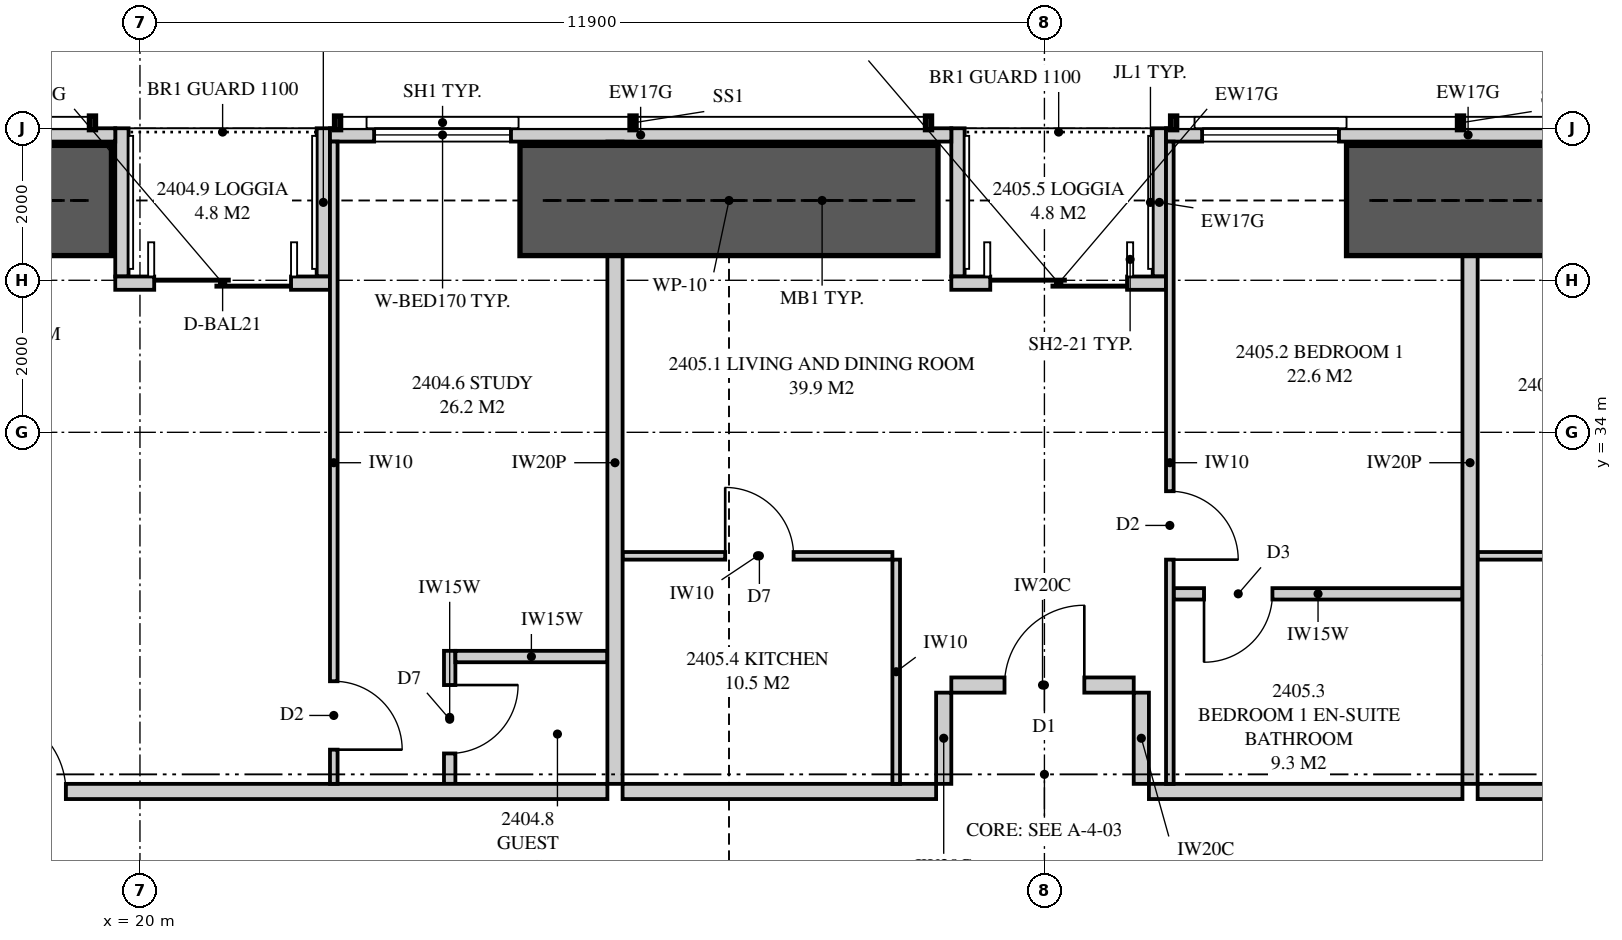
"""IFC4 building model, lengths in metres.
Left out: names, types, materials, properties, quantities, classifications, styles, units other than length and angle.
Written with IfcOpenShell. Run it as: python <this file> out.ifc"""

import sys

from ifc_helpers import new_model, si_unit, direction, frame, frame_2d, origin, place, context, subcontext, project, spatial, polyline, rectangle, outline, extrude, element, fill, save


model = new_model("IFC4")
c1 = context("Model", 3, precision=1e-05, world=origin(), true_north=direction((0.0, 1.0)))
c2 = subcontext(c1, "Body", "Model", "MODEL_VIEW")
j1 = project(units=[si_unit("LENGTHUNIT", "METRE"), si_unit("PLANEANGLEUNIT", "RADIAN")], contexts=[c1])
p1 = place(None, origin())
s1 = spatial("IfcSite", under=j1, at=p1, CompositionType="ELEMENT")
p2 = place(p1, origin())
s2 = spatial("IfcBuilding", under=s1, at=p2, CompositionType="ELEMENT")
p3 = place(p2, frame((0.0, 0.0, 91.45)))
s3 = spatial("IfcBuildingStorey", under=s2, at=p3, CompositionType="ELEMENT", Elevation=91.45)
p4 = place(p3, frame((41.449, 37.913, 0.0), z_axis=(0.0, 0.0, 1.0), x_axis=(-1.0, 0.0, 0.0)))
e1 = element("IfcWall", 1, at=p4, inside=s3, PredefinedType="SOLIDWALL", context=c2, shape_type="SweptSolid", body=[
    extrude(outline(polyline([(0.0, 0.0), (7.949, 0.0), (7.949, 2.15), (2.824, 2.15), (2.824, 3.11), (2.666, 3.11), (2.666, 2.15), (2.62, 2.15), (2.62, 3.11), (0.0, 3.11), (0.0, 0.0)])), frame((0.0, 0.087, 0.0), z_axis=(0.0, -1.0, 0.0), x_axis=(1.0, 0.0, 0.0)), (0.0, 0.0, 1.0), 0.175),
])
p5 = place(p4, frame((5.674, 0.0, 0.4)))
e2 = element("IfcOpeningElement", 2, at=p5, cuts=e1, PredefinedType="OPENING", context=c2, shape_type="SweptSolid", body=[
    extrude(rectangle(XDim=1.8, YDim=1.7, at=frame_2d((0.9, 0.85))), frame((0.0, 0.097, 0.0), z_axis=(0.0, -1.0, 0.0), x_axis=(1.0, 0.0, 0.0)), (0.0, 0.0, 1.0), 0.195),
])
p6 = place(p3, frame((30.675, 37.913, 0.0), z_axis=(0.0, 0.0, 1.0), x_axis=(-1.0, 0.0, 0.0)))
e3 = element("IfcWall", 3, at=p6, inside=s3, PredefinedType="SOLIDWALL", context=c2, shape_type="SweptSolid", body=[
    extrude(rectangle(XDim=8.175, YDim=0.175, at=frame_2d((4.087, 0.0))), origin(), (0.0, 0.0, 1.0), 2.15),
])
p7 = place(p6, frame((5.794, 0.0, 0.4)))
e4 = element("IfcOpeningElement", 4, at=p7, cuts=e3, PredefinedType="OPENING", context=c2, shape_type="SweptSolid", body=[
    extrude(rectangle(XDim=1.8, YDim=1.7, at=frame_2d((0.9, 0.85))), frame((0.0, 0.097, 0.0), z_axis=(0.0, -1.0, 0.0), x_axis=(1.0, 0.0, 0.0)), (0.0, 0.0, 1.0), 0.195),
])
p8 = place(p3, frame((19.675, 37.913, 0.0), z_axis=(0.0, 0.0, 1.0), x_axis=(-1.0, 0.0, 0.0)))
e5 = element("IfcWall", 5, at=p8, inside=s3, PredefinedType="SOLIDWALL", context=c2, shape_type="SweptSolid", body=[
    extrude(outline(polyline([(0.0, 0.0), (10.624, 0.0), (10.624, 3.11), (3.003, 3.11), (3.003, 2.15), (2.958, 2.15), (2.958, 3.11), (2.8, 3.11), (2.8, 2.15), (0.0, 2.15), (0.0, 0.0)])), frame((0.0, 0.087, 0.0), z_axis=(0.0, -1.0, 0.0), x_axis=(1.0, 0.0, 0.0)), (0.0, 0.0, 1.0), 0.175),
])
p9 = place(p8, frame((6.475, 0.0, 0.4)))
e6 = element("IfcOpeningElement", 6, at=p9, cuts=e5, PredefinedType="OPENING", context=c2, shape_type="SweptSolid", body=[
    extrude(rectangle(XDim=1.8, YDim=1.7, at=frame_2d((0.9, 0.85))), frame((0.0, 0.097, 0.0), z_axis=(0.0, -1.0, 0.0), x_axis=(1.0, 0.0, 0.0)), (0.0, 0.0, 1.0), 0.195),
])
p10 = place(p3, frame((33.5, 35.962, 0.0), z_axis=(0.0, 0.0, 1.0), x_axis=(-1.0, 0.0, 0.0)))
e7 = element("IfcWall", 7, at=p10, inside=s3, PredefinedType="SOLIDWALL", context=c2, shape_type="SweptSolid", body=[
    extrude(rectangle(XDim=2.825, YDim=0.175, at=frame_2d((1.413, 0.0))), origin(), (0.0, 0.0, 1.0), 3.11),
])
p11 = place(p10, frame((0.512, 0.0, 0.0)))
e8 = element("IfcOpeningElement", 8, at=p11, cuts=e7, PredefinedType="OPENING", context=c2, shape_type="SweptSolid", body=[
    extrude(rectangle(XDim=1.8, YDim=2.1, at=frame_2d((0.9, 1.05))), frame((0.0, 0.097, 0.0), z_axis=(0.0, -1.0, 0.0), x_axis=(1.0, 0.0, 0.0)), (0.0, 0.0, 1.0), 0.195),
])
for number, where, z_axis, x_axis in (
    (9, (33.413, 38.0, 0.0), (0.0, 0.0, 1.0), (0.0, -1.0, 0.0)),
    (10, (30.762, 38.0, 0.0), (0.0, 0.0, 1.0), (0.0, -1.0, 0.0)),
):
    element("IfcWall", number, at=place(p3, frame(where, z_axis=z_axis, x_axis=x_axis)), inside=s3, PredefinedType="SOLIDWALL", context=c2, shape_type="SweptSolid", body=[
        extrude(outline(polyline([(0.0, 0.0), (1.95, 0.0), (1.95, 3.11), (1.75, 3.11), (1.75, 2.15), (0.15, 2.15), (0.15, 3.11), (0.0, 3.11), (0.0, 0.0)])), frame((0.0, 0.087, 0.0), z_axis=(0.0, -1.0, 0.0), x_axis=(1.0, 0.0, 0.0)), (0.0, 0.0, 1.0), 0.175),
    ])
p12 = place(p3, frame((22.5, 35.962, 0.0), z_axis=(0.0, 0.0, 1.0), x_axis=(-1.0, 0.0, 0.0)))
e11 = element("IfcWall", 11, at=p12, inside=s3, PredefinedType="SOLIDWALL", context=c2, shape_type="SweptSolid", body=[
    extrude(rectangle(XDim=2.825, YDim=0.175, at=frame_2d((1.413, 0.0))), origin(), (0.0, 0.0, 1.0), 3.11),
])
p13 = place(p12, frame((0.512, 0.0, 0.0)))
e12 = element("IfcOpeningElement", 12, at=p13, cuts=e11, PredefinedType="OPENING", context=c2, shape_type="SweptSolid", body=[
    extrude(rectangle(XDim=1.8, YDim=2.1, at=frame_2d((0.9, 1.05))), frame((0.0, 0.097, 0.0), z_axis=(0.0, -1.0, 0.0), x_axis=(1.0, 0.0, 0.0)), (0.0, 0.0, 1.0), 0.195),
])
for number, where, z_axis, x_axis in (
    (13, (22.413, 38.0, 0.0), (0.0, 0.0, 1.0), (0.0, -1.0, 0.0)),
    (14, (19.762, 38.0, 0.0), (0.0, 0.0, 1.0), (0.0, -1.0, 0.0)),
):
    element("IfcWall", number, at=place(p3, frame(where, z_axis=z_axis, x_axis=x_axis)), inside=s3, PredefinedType="SOLIDWALL", context=c2, shape_type="SweptSolid", body=[
        extrude(outline(polyline([(0.0, 0.0), (1.95, 0.0), (1.95, 3.11), (1.75, 3.11), (1.75, 2.15), (0.15, 2.15), (0.15, 3.11), (0.0, 3.11), (0.0, 0.0)])), frame((0.0, 0.087, 0.0), z_axis=(0.0, -1.0, 0.0), x_axis=(1.0, 0.0, 0.0)), (0.0, 0.0, 1.0), 0.175),
    ])
p14 = place(p3, frame((26.25, 37.825, 0.0), z_axis=(0.0, 0.0, 1.0), x_axis=(0.0, -1.0, 0.0)))
e15 = element("IfcWall", 15, at=p14, inside=s3, PredefinedType="PARTITIONING", context=c2, shape_type="SweptSolid", body=[
    extrude(outline(polyline([(0.529, 2.15), (0.0, 2.15), (0.0, 0.0), (0.529, 0.0), (0.529, 0.479), (1.021, 0.479), (1.021, 0.0), (8.45, 0.0), (8.45, 3.11), (1.685, 3.11), (1.685, 2.15), (1.021, 2.15), (1.021, 1.671), (0.529, 1.671), (0.529, 2.15)])), frame((0.0, 0.1, 0.0), z_axis=(0.0, -1.0, 0.0), x_axis=(1.0, 0.0, 0.0)), (0.0, 0.0, 1.0), 0.2),
])
p15 = place(p3, frame((17.775, 29.275, 0.0), z_axis=(0.0, 0.0, 1.0), x_axis=(1.0, 0.0, 0.0)))
e16 = element("IfcWall", 16, at=p15, inside=s3, PredefinedType="PARTITIONING", context=c2, shape_type="SweptSolid", body=[
    extrude(rectangle(XDim=8.375, YDim=0.2, at=frame_2d((4.188, 0.0))), origin(), (0.0, 0.0, 1.0), 3.11),
])
p16 = place(p15, frame((0.2, 0.0, 0.0)))
e17 = element("IfcOpeningElement", 17, at=p16, cuts=e16, PredefinedType="OPENING", context=c2, shape_type="SweptSolid", body=[
    extrude(rectangle(XDim=1.05, YDim=2.2, at=frame_2d((0.525, 1.1))), frame((0.0, 0.11, 0.0), z_axis=(0.0, -1.0, 0.0), x_axis=(1.0, 0.0, 0.0)), (0.0, 0.0, 1.0), 0.22),
])
p17 = place(p3, frame((22.55, 37.825, 0.0), z_axis=(0.0, 0.0, 1.0), x_axis=(0.0, -1.0, 0.0)))
e18 = element("IfcWall", 18, at=p17, inside=s3, PredefinedType="PARTITIONING", context=c2, shape_type="SweptSolid", body=[
    extrude(outline(polyline([(0.0, 0.0), (8.45, 0.0), (8.45, 3.11), (1.635, 3.11), (1.635, 2.15), (0.0, 2.15), (0.0, 3.11), (0.0, 0.0)])), frame((0.0, 0.05, 0.0), z_axis=(0.0, -1.0, 0.0), x_axis=(1.0, 0.0, 0.0)), (0.0, 0.0, 1.0), 0.1),
])
p18 = place(p17, frame((7.1, 0.0, 0.0)))
e19 = element("IfcOpeningElement", 19, at=p18, cuts=e18, PredefinedType="OPENING", context=c2, shape_type="SweptSolid", body=[
    extrude(rectangle(XDim=0.9, YDim=2.1, at=frame_2d((0.45, 1.05))), frame((0.0, 0.06, 0.0), z_axis=(0.0, -1.0, 0.0), x_axis=(1.0, 0.0, 0.0)), (0.0, 0.0, 1.0), 0.12),
])
p19 = place(p3, frame((37.5, 37.825, 0.0), z_axis=(0.0, 0.0, 1.0), x_axis=(0.0, -1.0, 0.0)))
e20 = element("IfcWall", 20, at=p19, inside=s3, PredefinedType="PARTITIONING", context=c2, shape_type="SweptSolid", body=[
    extrude(outline(polyline([(0.529, 2.15), (0.0, 2.15), (0.0, 0.0), (0.529, 0.0), (0.529, 0.735), (1.021, 0.735), (1.021, 0.0), (8.45, 0.0), (8.45, 3.11), (1.685, 3.11), (1.685, 2.15), (1.021, 2.15), (1.021, 1.415), (0.529, 1.415), (0.529, 2.15)])), frame((0.0, 0.1, 0.0), z_axis=(0.0, -1.0, 0.0), x_axis=(1.0, 0.0, 0.0)), (0.0, 0.0, 1.0), 0.2),
])
p20 = place(p3, frame((26.35, 29.275, 0.0), z_axis=(0.0, 0.0, 1.0), x_axis=(1.0, 0.0, 0.0)))
e21 = element("IfcWall", 21, at=p20, inside=s3, PredefinedType="PARTITIONING", context=c2, shape_type="SweptSolid", body=[
    extrude(outline(polyline([(0.0, 0.0), (4.125, 0.0), (4.125, 3.11), (1.737, 3.11), (1.737, 2.541), (1.062, 2.541), (1.062, 3.11), (0.0, 3.11), (0.0, 0.0)])), frame((0.0, 0.1, 0.0), z_axis=(0.0, -1.0, 0.0), x_axis=(1.0, 0.0, 0.0)), (0.0, 0.0, 1.0), 0.2),
])
p21 = place(p3, frame((33.55, 37.825, 0.0), z_axis=(0.0, 0.0, 1.0), x_axis=(0.0, -1.0, 0.0)))
e22 = element("IfcWall", 22, at=p21, inside=s3, PredefinedType="PARTITIONING", context=c2, shape_type="SweptSolid", body=[
    extrude(outline(polyline([(0.0, 0.0), (8.45, 0.0), (8.45, 3.11), (1.635, 3.11), (1.635, 2.15), (0.0, 2.15), (0.0, 3.11), (0.0, 0.0)])), frame((0.0, 0.05, 0.0), z_axis=(0.0, -1.0, 0.0), x_axis=(1.0, 0.0, 0.0)), (0.0, 0.0, 1.0), 0.1),
])
p22 = place(p21, frame((4.6, 0.0, 0.0)))
e23 = element("IfcOpeningElement", 23, at=p22, cuts=e22, PredefinedType="OPENING", context=c2, shape_type="SweptSolid", body=[
    extrude(rectangle(XDim=0.9, YDim=2.1, at=frame_2d((0.45, 1.05))), frame((0.0, 0.06, 0.0), z_axis=(0.0, -1.0, 0.0), x_axis=(1.0, 0.0, 0.0)), (0.0, 0.0, 1.0), 0.12),
])
p23 = place(p3, frame((33.6, 31.875, 0.0), z_axis=(0.0, 0.0, 1.0), x_axis=(1.0, 0.0, 0.0)))
e24 = element("IfcWall", 24, at=p23, inside=s3, PredefinedType="PLUMBINGWALL", context=c2, shape_type="SweptSolid", body=[
    extrude(rectangle(XDim=3.8, YDim=0.15, at=frame_2d((1.9, 0.0))), origin(), (0.0, 0.0, 1.0), 3.11),
])
p24 = place(p23, frame((0.4, 0.0, 0.0)))
e25 = element("IfcOpeningElement", 25, at=p24, cuts=e24, PredefinedType="OPENING", context=c2, shape_type="SweptSolid", body=[
    extrude(rectangle(XDim=0.9, YDim=2.1, at=frame_2d((0.45, 1.05))), frame((0.0, 0.085, 0.0), z_axis=(0.0, -1.0, 0.0), x_axis=(1.0, 0.0, 0.0)), (0.0, 0.0, 1.0), 0.17),
])
p25 = place(p3, frame((26.35, 32.375, 0.0), z_axis=(0.0, 0.0, 1.0), x_axis=(1.0, 0.0, 0.0)))
e26 = element("IfcWall", 26, at=p25, inside=s3, PredefinedType="PARTITIONING", context=c2, shape_type="SweptSolid", body=[
    extrude(outline(polyline([(0.0, 0.0), (3.55, 0.0), (3.55, 3.11), (1.687, 3.11), (1.687, 2.541), (1.113, 2.541), (1.113, 3.11), (0.0, 3.11), (0.0, 0.0)])), frame((0.0, 0.05, 0.0), z_axis=(0.0, -1.0, 0.0), x_axis=(1.0, 0.0, 0.0)), (0.0, 0.0, 1.0), 0.1),
])
p26 = place(p25, frame((1.35, 0.0, 0.0)))
e27 = element("IfcOpeningElement", 27, at=p26, cuts=e26, PredefinedType="OPENING", context=c2, shape_type="SweptSolid", body=[
    extrude(rectangle(XDim=0.9, YDim=2.1, at=frame_2d((0.45, 1.05))), frame((0.0, 0.06, 0.0), z_axis=(0.0, -1.0, 0.0), x_axis=(1.0, 0.0, 0.0)), (0.0, 0.0, 1.0), 0.12),
])
p27 = place(p3, frame((29.95, 32.325, 0.0), z_axis=(0.0, 0.0, 1.0), x_axis=(0.0, -1.0, 0.0)))
e28 = element("IfcWall", 28, at=p27, inside=s3, PredefinedType="PARTITIONING", context=c2, shape_type="SweptSolid", body=[
    extrude(rectangle(XDim=2.95, YDim=0.1, at=frame_2d((1.475, 0.0))), origin(), (0.0, 0.0, 1.0), 3.11),
])
p28 = place(p3, frame((37.6, 29.275, 0.0), z_axis=(0.0, 0.0, 1.0), x_axis=(1.0, 0.0, 0.0)))
e29 = element("IfcWall", 29, at=p28, inside=s3, PredefinedType="PARTITIONING", context=c2, shape_type="SweptSolid", body=[
    extrude(outline(polyline([(0.0, 0.0), (8.425, 0.0), (8.425, 3.11), (1.362, 3.11), (1.362, 2.541), (0.688, 2.541), (0.688, 3.11), (0.0, 3.11), (0.0, 0.0)])), frame((0.0, 0.1, 0.0), z_axis=(0.0, -1.0, 0.0), x_axis=(1.0, 0.0, 0.0)), (0.0, 0.0, 1.0), 0.2),
])
p29 = place(p28, frame((3.8, 0.0, 0.0)))
e30 = element("IfcOpeningElement", 30, at=p29, cuts=e29, PredefinedType="OPENING", context=c2, shape_type="SweptSolid", body=[
    extrude(rectangle(XDim=1.05, YDim=2.2, at=frame_2d((0.525, 1.1))), frame((0.0, 0.11, 0.0), z_axis=(0.0, -1.0, 0.0), x_axis=(1.0, 0.0, 0.0)), (0.0, 0.0, 1.0), 0.22),
])
p30 = place(p3, frame((37.6, 32.375, 0.0), z_axis=(0.0, 0.0, 1.0), x_axis=(1.0, 0.0, 0.0)))
e31 = element("IfcWall", 31, at=p30, inside=s3, PredefinedType="PARTITIONING", context=c2, shape_type="SweptSolid", body=[
    extrude(outline(polyline([(0.0, 0.0), (3.55, 0.0), (3.55, 3.11), (1.312, 3.11), (1.312, 2.541), (0.738, 2.541), (0.738, 3.11), (0.0, 3.11), (0.0, 0.0)])), frame((0.0, 0.05, 0.0), z_axis=(0.0, -1.0, 0.0), x_axis=(1.0, 0.0, 0.0)), (0.0, 0.0, 1.0), 0.1),
])
p31 = place(p30, frame((1.35, 0.0, 0.0)))
e32 = element("IfcOpeningElement", 32, at=p31, cuts=e31, PredefinedType="OPENING", context=c2, shape_type="SweptSolid", body=[
    extrude(rectangle(XDim=0.9, YDim=2.1, at=frame_2d((0.45, 1.05))), frame((0.0, 0.06, 0.0), z_axis=(0.0, -1.0, 0.0), x_axis=(1.0, 0.0, 0.0)), (0.0, 0.0, 1.0), 0.12),
])
p32 = place(p3, frame((33.275, 29.275, 0.0), z_axis=(0.0, 0.0, 1.0), x_axis=(1.0, 0.0, 0.0)))
e33 = element("IfcWall", 33, at=p32, inside=s3, PredefinedType="PARTITIONING", context=c2, shape_type="SweptSolid", body=[
    extrude(rectangle(XDim=4.125, YDim=0.2, at=frame_2d((2.062, 0.0))), origin(), (0.0, 0.0, 1.0), 3.11),
])
p33 = place(p3, frame((30.675, 30.675, 0.0), z_axis=(0.0, 0.0, 1.0), x_axis=(1.0, 0.0, 0.0)))
e34 = element("IfcWall", 34, at=p33, inside=s3, PredefinedType="PARTITIONING", context=c2, shape_type="SweptSolid", body=[
    extrude(rectangle(XDim=2.4, YDim=0.2, at=frame_2d((1.2, 0.0))), origin(), (0.0, 0.0, 1.0), 3.11),
])
p34 = place(p33, frame((0.7, 0.0, 0.0)))
e35 = element("IfcOpeningElement", 35, at=p34, cuts=e34, PredefinedType="OPENING", context=c2, shape_type="SweptSolid", body=[
    extrude(rectangle(XDim=1.05, YDim=2.2, at=frame_2d((0.525, 1.1))), frame((0.0, 0.11, 0.0), z_axis=(0.0, -1.0, 0.0), x_axis=(1.0, 0.0, 0.0)), (0.0, 0.0, 1.0), 0.22),
])
for number, where, z_axis, x_axis in (
    (36, (30.575, 29.375, 0.0), (0.0, 0.0, 1.0), (0.0, 1.0, 0.0)),
    (37, (33.175, 29.375, 0.0), (0.0, 0.0, 1.0), (0.0, 1.0, 0.0)),
):
    element("IfcWall", number, at=place(p3, frame(where, z_axis=z_axis, x_axis=x_axis)), inside=s3, PredefinedType="PARTITIONING", context=c2, shape_type="SweptSolid", body=[
        extrude(rectangle(XDim=1.2, YDim=0.2, at=frame_2d((0.6, 0.0))), origin(), (0.0, 0.0, 1.0), 3.11),
    ])
p35 = place(p3, frame((24.075, 29.375, 0.0), z_axis=(0.0, 0.0, 1.0), x_axis=(0.0, 1.0, 0.0)))
e38 = element("IfcWall", 38, at=p35, inside=s3, PredefinedType="PLUMBINGWALL", context=c2, shape_type="SweptSolid", body=[
    extrude(rectangle(XDim=1.75, YDim=0.15, at=frame_2d((0.875, 0.0))), origin(), (0.0, 0.0, 1.0), 3.11),
])
p36 = place(p35, frame((0.4, 0.0, 0.0)))
e39 = element("IfcOpeningElement", 39, at=p36, cuts=e38, PredefinedType="OPENING", context=c2, shape_type="SweptSolid", body=[
    extrude(rectangle(XDim=0.9, YDim=2.1, at=frame_2d((0.45, 1.05))), frame((0.0, 0.085, 0.0), z_axis=(0.0, -1.0, 0.0), x_axis=(1.0, 0.0, 0.0)), (0.0, 0.0, 1.0), 0.17),
])
p37 = place(p3, frame((26.15, 31.05, 0.0), z_axis=(0.0, 0.0, 1.0), x_axis=(-1.0, 0.0, 0.0)))
e40 = element("IfcWall", 40, at=p37, inside=s3, PredefinedType="PLUMBINGWALL", context=c2, shape_type="SweptSolid", body=[
    extrude(rectangle(XDim=2.0, YDim=0.15, at=frame_2d((1.0, 0.0))), origin(), (0.0, 0.0, 1.0), 3.11),
])
for number, where, z_axis, x_axis in (
    (41, (35.875, 37.05, 0.0), (0.0, 0.0, 1.0), (1.0, 0.0, 0.0)),
    (42, (25.0, 37.05, 0.0), (0.0, 0.0, 1.0), (1.0, 0.0, 0.0)),
    (43, (14.125, 37.05, 0.0), (0.0, 0.0, 1.0), (1.0, 0.0, 0.0)),
):
    element("IfcWall", number, at=place(p3, frame(where, z_axis=z_axis, x_axis=x_axis)), inside=s3, PredefinedType="SHEAR", context=c2, shape_type="SweptSolid", body=[
        extrude(rectangle(XDim=5.5, YDim=1.45, at=frame_2d((2.75, 0.0))), origin(), (0.0, 0.0, 1.0), 3.35),
    ])
p38 = place(p5, origin())
e44 = element("IfcWindow", 44, at=p38, inside=s3, PartitioningType="SINGLE_PANEL", PredefinedType="WINDOW", context=c2, shape_type="SweptSolid", body=[
    extrude(rectangle(XDim=1.8, YDim=1.7, at=frame_2d((0.9, 0.85))), frame((0.0, 0.03, 0.0), z_axis=(0.0, -1.0, 0.0), x_axis=(1.0, 0.0, 0.0)), (0.0, 0.0, 1.0), 0.06),
])
fill(e2, e44)
p39 = place(p11, origin())
e45 = element("IfcDoor", 45, at=p39, inside=s3, OperationType="SLIDING_TO_LEFT", PredefinedType="DOOR", context=c2, shape_type="SweptSolid", body=[
    extrude(rectangle(XDim=1.8, YDim=2.1, at=frame_2d((0.9, 1.05))), frame((0.0, 0.025, 0.0), z_axis=(0.0, -1.0, 0.0), x_axis=(1.0, 0.0, 0.0)), (0.0, 0.0, 1.0), 0.05),
])
fill(e8, e45)
p40 = place(p7, origin())
e46 = element("IfcWindow", 46, at=p40, inside=s3, PartitioningType="SINGLE_PANEL", PredefinedType="WINDOW", context=c2, shape_type="SweptSolid", body=[
    extrude(rectangle(XDim=1.8, YDim=1.7, at=frame_2d((0.9, 0.85))), frame((0.0, 0.03, 0.0), z_axis=(0.0, -1.0, 0.0), x_axis=(1.0, 0.0, 0.0)), (0.0, 0.0, 1.0), 0.06),
])
fill(e4, e46)
p41 = place(p13, origin())
e47 = element("IfcDoor", 47, at=p41, inside=s3, OperationType="SLIDING_TO_LEFT", PredefinedType="DOOR", context=c2, shape_type="SweptSolid", body=[
    extrude(rectangle(XDim=1.8, YDim=2.1, at=frame_2d((0.9, 1.05))), frame((0.0, 0.025, 0.0), z_axis=(0.0, -1.0, 0.0), x_axis=(1.0, 0.0, 0.0)), (0.0, 0.0, 1.0), 0.05),
])
fill(e12, e47)
p42 = place(p16, origin())
e48 = element("IfcDoor", 48, at=p42, inside=s3, OperationType="SINGLE_SWING_LEFT", PredefinedType="DOOR", context=c2, shape_type="SweptSolid", body=[
    extrude(rectangle(XDim=1.05, YDim=2.2, at=frame_2d((0.525, 1.1))), frame((0.0, 0.025, 0.0), z_axis=(0.0, -1.0, 0.0), x_axis=(1.0, 0.0, 0.0)), (0.0, 0.0, 1.0), 0.05),
])
fill(e17, e48)
p43 = place(p18, origin())
e49 = element("IfcDoor", 49, at=p43, inside=s3, OperationType="SINGLE_SWING_RIGHT", PredefinedType="DOOR", context=c2, shape_type="SweptSolid", body=[
    extrude(rectangle(XDim=0.9, YDim=2.1, at=frame_2d((0.45, 1.05))), frame((0.0, 0.025, 0.0), z_axis=(0.0, -1.0, 0.0), x_axis=(1.0, 0.0, 0.0)), (0.0, 0.0, 1.0), 0.05),
])
fill(e19, e49)
p44 = place(p34, origin())
e50 = element("IfcDoor", 50, at=p44, inside=s3, OperationType="SINGLE_SWING_RIGHT", PredefinedType="DOOR", context=c2, shape_type="SweptSolid", body=[
    extrude(rectangle(XDim=1.05, YDim=2.2, at=frame_2d((0.525, 1.1))), frame((0.0, 0.025, 0.0), z_axis=(0.0, -1.0, 0.0), x_axis=(1.0, 0.0, 0.0)), (0.0, 0.0, 1.0), 0.05),
])
fill(e35, e50)
p45 = place(p22, origin())
e51 = element("IfcDoor", 51, at=p45, inside=s3, OperationType="SINGLE_SWING_RIGHT", PredefinedType="DOOR", context=c2, shape_type="SweptSolid", body=[
    extrude(rectangle(XDim=0.9, YDim=2.1, at=frame_2d((0.45, 1.05))), frame((0.0, 0.025, 0.0), z_axis=(0.0, -1.0, 0.0), x_axis=(1.0, 0.0, 0.0)), (0.0, 0.0, 1.0), 0.05),
])
fill(e23, e51)
p46 = place(p24, frame((0.9, 0.0, 0.0), z_axis=(0.0, 0.0, 1.0), x_axis=(-1.0, 0.0, 0.0)))
e52 = element("IfcDoor", 52, at=p46, inside=s3, OperationType="SINGLE_SWING_RIGHT", PredefinedType="DOOR", context=c2, shape_type="SweptSolid", body=[
    extrude(rectangle(XDim=0.9, YDim=2.1, at=frame_2d((0.45, 1.05))), frame((0.0, 0.025, 0.0), z_axis=(0.0, -1.0, 0.0), x_axis=(1.0, 0.0, 0.0)), (0.0, 0.0, 1.0), 0.05),
])
fill(e25, e52)
p47 = place(p26, origin())
e53 = element("IfcDoor", 53, at=p47, inside=s3, OperationType="SINGLE_SWING_LEFT", PredefinedType="DOOR", context=c2, shape_type="SweptSolid", body=[
    extrude(rectangle(XDim=0.9, YDim=2.1, at=frame_2d((0.45, 1.05))), frame((0.0, 0.025, 0.0), z_axis=(0.0, -1.0, 0.0), x_axis=(1.0, 0.0, 0.0)), (0.0, 0.0, 1.0), 0.05),
])
fill(e27, e53)
p48 = place(p36, frame((0.9, 0.0, 0.0), z_axis=(0.0, 0.0, 1.0), x_axis=(-1.0, 0.0, 0.0)))
e54 = element("IfcDoor", 54, at=p48, inside=s3, OperationType="SINGLE_SWING_LEFT", PredefinedType="DOOR", context=c2, shape_type="SweptSolid", body=[
    extrude(rectangle(XDim=0.9, YDim=2.1, at=frame_2d((0.45, 1.05))), frame((0.0, 0.025, 0.0), z_axis=(0.0, -1.0, 0.0), x_axis=(1.0, 0.0, 0.0)), (0.0, 0.0, 1.0), 0.05),
])
fill(e39, e54)
save(model, sys.argv[1])
